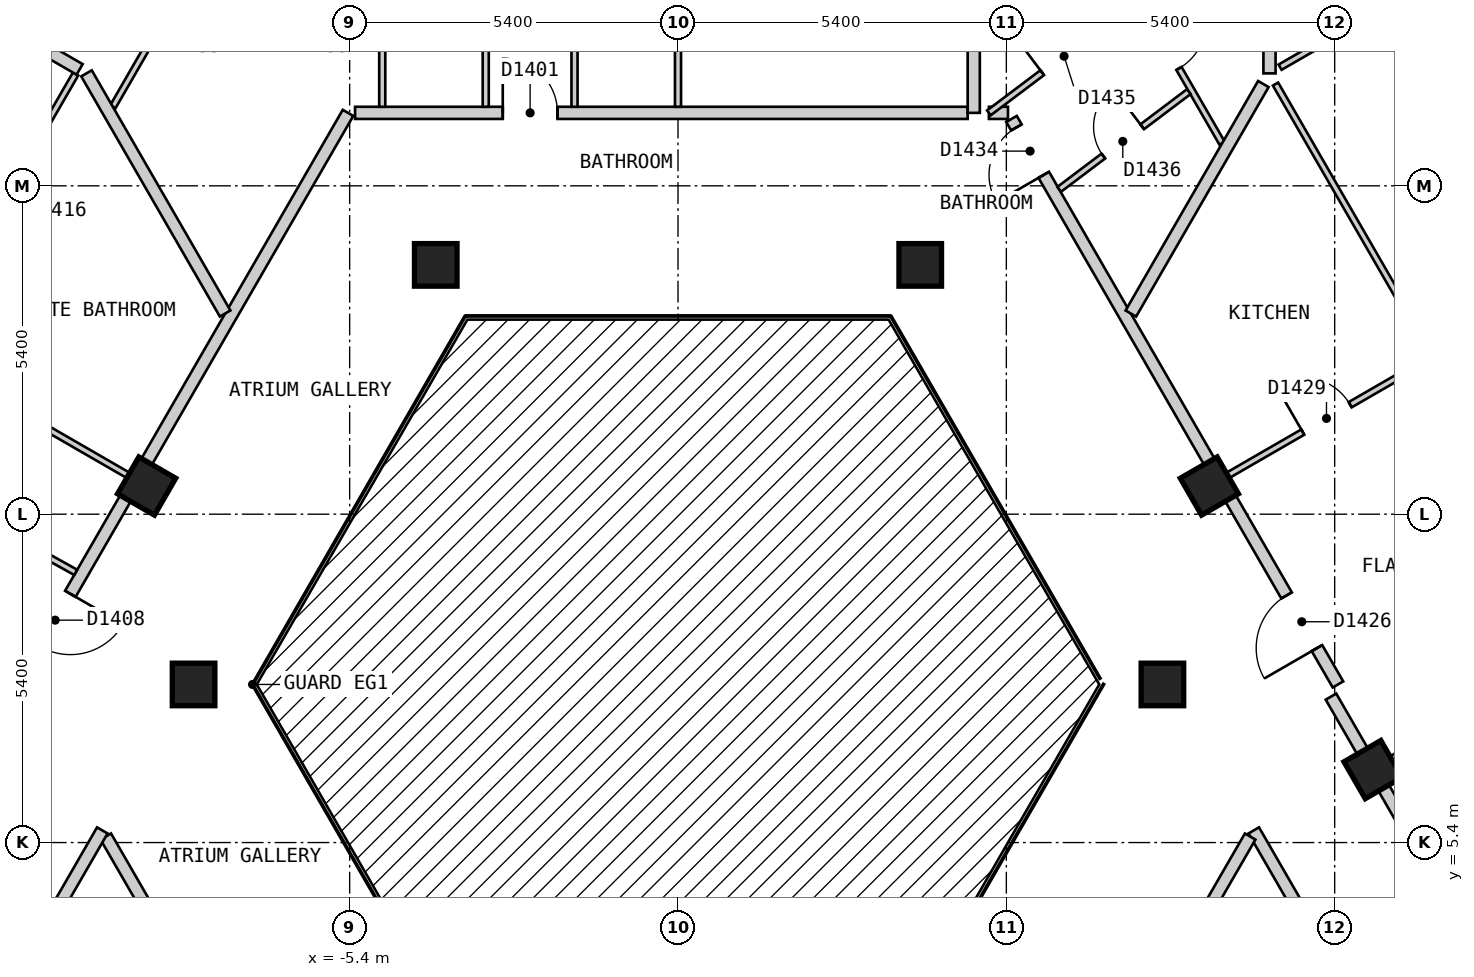
"""IFC4 building model, lengths in metres.
Left out: names, types, materials, properties, quantities, classifications, styles, units other than length and angle.
Written with IfcOpenShell. Run it as: python <this file> out.ifc"""

import sys

from ifc_helpers import new_model, si_unit, direction, frame, frame_2d, origin, origin_2d, place, context, subcontext, project, spatial, rectangle, extrude, element, fill, save


model = new_model("IFC4")
c1 = context("Model", 3, precision=1e-05, world=origin(), true_north=direction((0.0, 1.0)))
c2 = subcontext(c1, "Body", "Model", "MODEL_VIEW")
j1 = project(units=[si_unit("LENGTHUNIT", "METRE"), si_unit("PLANEANGLEUNIT", "RADIAN")], contexts=[c1])
p1 = place(None, origin())
s1 = spatial("IfcSite", under=j1, at=p1, CompositionType="ELEMENT")
p2 = place(p1, origin())
s2 = spatial("IfcBuilding", under=s1, at=p2, CompositionType="ELEMENT")
p3 = place(p2, frame((0.0, 0.0, 172.2)))
s3 = spatial("IfcBuildingStorey", under=s2, at=p3, CompositionType="ELEMENT", Elevation=172.2)
for number, where, z_axis, x_axis in (
    (1, (11.431, 6.6, 0.0), (0.0, 0.0, 1.0), (-0.5, 0.866, 0.0)),
    (2, (7.967, 8.0, 0.0), (0.0, 0.0, 1.0), (1.0, 0.0, 0.0)),
    (3, (8.739, 11.263, 0.0), (0.0, 0.0, 1.0), (-0.5, 0.866, 0.0)),
    (4, (3.984, 14.9, 0.0), (0.0, 0.0, 1.0), (1.0, 0.0, 0.0)),
    (5, (-3.984, 14.9, 0.0), (0.0, 0.0, 1.0), (1.0, 0.0, 0.0)),
    (6, (-8.739, 11.263, 0.0), (0.0, 0.0, 1.0), (-0.5, -0.866, 0.0)),
    (7, (-7.967, 8.0, 0.0), (0.0, 0.0, 1.0), (1.0, 0.0, 0.0)),
):
    element("IfcColumn", number, at=place(p3, frame(where, z_axis=z_axis, x_axis=x_axis)), inside=s3, PredefinedType="COLUMN", context=c2, shape_type="SweptSolid", body=[
        extrude(rectangle(XDim=0.7, YDim=0.7, at=origin_2d()), origin(), (0.0, 0.0, 1.0), 3.0),
    ])
p4 = place(p3, frame((-9.411, 5.5, 0.0), z_axis=(0.0, 0.0, 1.0), x_axis=(0.500018099276, -0.86601495391, 0.0)))
e8 = element("IfcWall", 8, at=p4, inside=s3, PredefinedType="PARTITIONING", context=c2, shape_type="SweptSolid", body=[
    extrude(rectangle(XDim=4.765, YDim=0.2, at=frame_2d((2.383, 0.0))), origin(), (0.0, 0.0, 1.0), 2.7),
])
p5 = place(p3, frame((9.469, 5.6, 0.0), z_axis=(0.0, 0.0, 1.0), x_axis=(0.499964524401, -0.866045884662, 0.0)))
e9 = element("IfcWall", 9, at=p5, inside=s3, PredefinedType="PARTITIONING", context=c2, shape_type="SweptSolid", body=[
    extrude(rectangle(XDim=7.042, YDim=0.2, at=frame_2d((3.521, 0.0))), origin(), (0.0, 0.0, 1.0), 2.7),
])
p6 = place(p5, frame((3.129, 0.0, 0.0)))
e10 = element("IfcOpeningElement", 10, at=p6, cuts=e9, PredefinedType="OPENING", context=c2, shape_type="SweptSolid", body=[
    extrude(rectangle(XDim=0.9, YDim=2.1, at=frame_2d((0.45, 1.05))), frame((0.0, 0.11, 0.0), z_axis=(0.0, -1.0, 0.0), x_axis=(1.0, 0.0, 0.0)), (0.0, 0.0, 1.0), 0.22),
])
p7 = place(p3, frame((10.739, 7.8, 0.0), z_axis=(0.0, 0.0, 1.0), x_axis=(0.499964311759, -0.86604600742, 0.0)))
e11 = element("IfcWall", 11, at=p7, inside=s3, PredefinedType="PARTITIONING", context=c2, shape_type="SweptSolid", body=[
    extrude(rectangle(XDim=9.583, YDim=0.2, at=frame_2d((4.792, 0.0))), origin(), (0.0, 0.0, 1.0), 2.7),
])
p8 = place(p3, frame((5.485, 17.3, 0.0), z_axis=(0.0, 0.0, 1.0), x_axis=(0.499965832213, -0.866045129667, 0.0)))
e12 = element("IfcWall", 12, at=p8, inside=s3, PredefinedType="PARTITIONING", context=c2, shape_type="SweptSolid", body=[
    extrude(rectangle(XDim=10.739, YDim=0.2, at=frame_2d((5.369, 0.0))), origin(), (0.0, 0.0, 1.0), 2.7),
])
p9 = place(p8, frame((9.048, 0.0, 0.0)))
e13 = element("IfcOpeningElement", 13, at=p9, cuts=e12, PredefinedType="OPENING", context=c2, shape_type="SweptSolid", body=[
    extrude(rectangle(XDim=1.0, YDim=2.1, at=frame_2d((0.5, 1.05))), frame((0.0, 0.11, 0.0), z_axis=(0.0, -1.0, 0.0), x_axis=(1.0, 0.0, 0.0)), (0.0, 0.0, 1.0), 0.22),
])
p10 = place(p8, frame((0.161, 0.0, 0.0)))
e14 = element("IfcOpeningElement", 14, at=p10, cuts=e12, PredefinedType="OPENING", context=c2, shape_type="SweptSolid", body=[
    extrude(rectangle(XDim=0.9, YDim=2.1, at=frame_2d((0.45, 1.05))), frame((0.0, 0.11, 0.0), z_axis=(0.0, -1.0, 0.0), x_axis=(1.0, 0.0, 0.0)), (0.0, 0.0, 1.0), 0.22),
])
p11 = place(p3, frame((-5.311, 17.4, 0.0), z_axis=(0.0, 0.0, 1.0), x_axis=(1.0, 0.0, 0.0)))
e15 = element("IfcWall", 15, at=p11, inside=s3, PredefinedType="PARTITIONING", context=c2, shape_type="SweptSolid", body=[
    extrude(rectangle(XDim=10.075, YDim=0.2, at=frame_2d((5.038, 0.0))), origin(), (0.0, 0.0, 1.0), 2.7),
])
p12 = place(p11, frame((2.429, 0.0, 0.0)))
e16 = element("IfcOpeningElement", 16, at=p12, cuts=e15, PredefinedType="OPENING", context=c2, shape_type="SweptSolid", body=[
    extrude(rectangle(XDim=0.9, YDim=2.1, at=frame_2d((0.45, 1.05))), frame((0.0, 0.11, 0.0), z_axis=(0.0, -1.0, 0.0), x_axis=(1.0, 0.0, 0.0)), (0.0, 0.0, 1.0), 0.22),
])
p13 = place(p3, frame((5.113, 17.4, 0.0), z_axis=(0.0, 0.0, 1.0), x_axis=(1.0, 0.0, 0.0)))
e17 = element("IfcWall", 17, at=p13, inside=s3, PredefinedType="PARTITIONING", context=c2, shape_type="SweptSolid", body=[
    extrude(rectangle(XDim=0.314, YDim=0.2, at=frame_2d((0.157, 0.0))), origin(), (0.0, 0.0, 1.0), 2.7),
])
p14 = place(p3, frame((7.028, 1.373, 0.0), z_axis=(0.0, 0.0, 1.0), x_axis=(0.499953126767, 0.866052464367, 0.0)))
e18 = element("IfcWall", 18, at=p14, inside=s3, PredefinedType="PARTITIONING", context=c2, shape_type="SweptSolid", body=[
    extrude(rectangle(XDim=4.764, YDim=0.2, at=frame_2d((2.382, 0.0))), origin(), (0.0, 0.0, 1.0), 2.7),
])
p15 = place(p3, frame((-13.048, -0.601, 0.0), z_axis=(0.0, 0.0, 1.0), x_axis=(0.499982180423, 0.866035691677, 0.0)))
e19 = element("IfcWall", 19, at=p15, inside=s3, PredefinedType="PARTITIONING", context=c2, shape_type="SweptSolid", body=[
    extrude(rectangle(XDim=7.16, YDim=0.2, at=frame_2d((3.58, 0.0))), origin(), (0.0, 0.0, 1.0), 2.7),
])
p16 = place(p15, frame((3.13, 0.0, 0.0)))
e20 = element("IfcOpeningElement", 20, at=p16, cuts=e19, PredefinedType="OPENING", context=c2, shape_type="SweptSolid", body=[
    extrude(rectangle(XDim=0.9, YDim=2.1, at=frame_2d((0.45, 1.05))), frame((0.0, 0.11, 0.0), z_axis=(0.0, -1.0, 0.0), x_axis=(1.0, 0.0, 0.0)), (0.0, 0.0, 1.0), 0.22),
])
p17 = place(p3, frame((-10.854, 8.0, 0.0), z_axis=(0.0, 0.0, 1.0), x_axis=(0.499997637144, 0.866026767976, 0.0)))
e21 = element("IfcWall", 21, at=p17, inside=s3, PredefinedType="PARTITIONING", context=c2, shape_type="SweptSolid", body=[
    extrude(rectangle(XDim=10.854, YDim=0.2, at=frame_2d((5.427, 0.0))), origin(), (0.0, 0.0, 1.0), 2.7),
])
p18 = place(p17, frame((0.721, 0.0, 0.0)))
e22 = element("IfcOpeningElement", 22, at=p18, cuts=e21, PredefinedType="OPENING", context=c2, shape_type="SweptSolid", body=[
    extrude(rectangle(XDim=1.0, YDim=2.1, at=frame_2d((0.5, 1.05))), frame((0.0, 0.11, 0.0), z_axis=(0.0, -1.0, 0.0), x_axis=(1.0, 0.0, 0.0)), (0.0, 0.0, 1.0), 0.22),
])
p19 = place(p3, frame((7.073, 20.15, 0.0), z_axis=(0.0, 0.0, 1.0), x_axis=(0.499917691695, -0.866072919292, 0.0)))
e23 = element("IfcWall", 23, at=p19, inside=s3, PredefinedType="PARTITIONING", context=c2, shape_type="SweptSolid", body=[
    extrude(rectangle(XDim=3.753, YDim=0.1, at=frame_2d((1.876, 0.0))), origin(), (0.0, 0.0, 1.0), 2.7),
])
p20 = place(p19, frame((1.432, 0.0, 0.0)))
e24 = element("IfcOpeningElement", 24, at=p20, cuts=e23, PredefinedType="OPENING", context=c2, shape_type="SweptSolid", body=[
    extrude(rectangle(XDim=0.9, YDim=2.1, at=frame_2d((0.45, 1.05))), frame((0.0, 0.06, 0.0), z_axis=(0.0, -1.0, 0.0), x_axis=(1.0, 0.0, 0.0)), (0.0, 0.0, 1.0), 0.12),
])
p21 = place(p3, frame((9.827, 17.874, 0.0), z_axis=(0.0, 0.0, 1.0), x_axis=(0.499962189394, -0.866047232647, 0.0)))
e25 = element("IfcWall", 25, at=p21, inside=s3, PredefinedType="PARTITIONING", context=c2, shape_type="SweptSolid", body=[
    extrude(rectangle(XDim=11.401, YDim=0.1, at=frame_2d((5.701, 0.0))), origin(), (0.0, 0.0, 1.0), 2.7),
])
p22 = place(p21, frame((7.433, 0.0, 0.0)))
e26 = element("IfcOpeningElement", 26, at=p22, cuts=e25, PredefinedType="OPENING", context=c2, shape_type="SweptSolid", body=[
    extrude(rectangle(XDim=0.9, YDim=2.1, at=frame_2d((0.45, 1.05))), frame((0.0, 0.06, 0.0), z_axis=(0.0, -1.0, 0.0), x_axis=(1.0, 0.0, 0.0)), (0.0, 0.0, 1.0), 0.12),
])
p23 = place(p3, frame((-4.864, 20.769, 0.0), z_axis=(0.0, 0.0, 1.0), x_axis=(0.0, -1.0, 0.0)))
e27 = element("IfcWall", 27, at=p23, inside=s3, PredefinedType="PARTITIONING", context=c2, shape_type="SweptSolid", body=[
    extrude(rectangle(XDim=3.269, YDim=0.1, at=frame_2d((1.635, 0.0))), origin(), (0.0, 0.0, 1.0), 2.7),
])
p24 = place(p3, frame((0.0, 20.43, 0.0), z_axis=(0.0, 0.0, 1.0), x_axis=(0.0, -1.0, 0.0)))
e28 = element("IfcWall", 28, at=p24, inside=s3, PredefinedType="PARTITIONING", context=c2, shape_type="SweptSolid", body=[
    extrude(rectangle(XDim=2.93, YDim=0.1, at=frame_2d((1.465, 0.0))), origin(), (0.0, 0.0, 1.0), 2.7),
])
p25 = place(p3, frame((-13.444, 11.814, 0.0), z_axis=(0.0, 0.0, 1.0), x_axis=(0.873653620945, -0.486548405207, 0.0)))
e29 = element("IfcWall", 29, at=p25, inside=s3, PredefinedType="PARTITIONING", context=c2, shape_type="SweptSolid", body=[
    extrude(rectangle(XDim=4.051, YDim=0.1, at=frame_2d((2.025, 0.0))), origin(), (0.0, 0.0, 1.0), 2.7),
])
p26 = place(p25, frame((1.65, 0.0, 0.0)))
e30 = element("IfcOpeningElement", 30, at=p26, cuts=e29, PredefinedType="OPENING", context=c2, shape_type="SweptSolid", body=[
    extrude(rectangle(XDim=0.8, YDim=2.1, at=frame_2d((0.4, 1.05))), frame((0.0, 0.06, 0.0), z_axis=(0.0, -1.0, 0.0), x_axis=(1.0, 0.0, 0.0)), (0.0, 0.0, 1.0), 0.12),
])
p27 = place(p3, frame((-9.295, 17.5, 0.0), z_axis=(0.0, 0.0, 1.0), x_axis=(0.500060839138, 0.865990275442, 0.0)))
e31 = element("IfcWall", 31, at=p27, inside=s3, PredefinedType="PARTITIONING", context=c2, shape_type="SweptSolid", body=[
    extrude(rectangle(XDim=3.81, YDim=0.1, at=frame_2d((1.905, 0.0))), origin(), (0.0, 0.0, 1.0), 2.7),
])
p28 = place(p27, frame((2.079, 0.0, 0.0)))
e32 = element("IfcOpeningElement", 32, at=p28, cuts=e31, PredefinedType="OPENING", context=c2, shape_type="SweptSolid", body=[
    extrude(rectangle(XDim=0.8, YDim=2.1, at=frame_2d((0.4, 1.05))), frame((0.0, 0.06, 0.0), z_axis=(0.0, -1.0, 0.0), x_axis=(1.0, 0.0, 0.0)), (0.0, 0.0, 1.0), 0.12),
])
p29 = place(p3, frame((-15.704, 8.0, 0.0), z_axis=(0.0, 0.0, 1.0), x_axis=(0.500005637941, 0.866022148693, 0.0)))
e33 = element("IfcWall", 33, at=p29, inside=s3, PredefinedType="PARTITIONING", context=c2, shape_type="SweptSolid", body=[
    extrude(rectangle(XDim=11.592, YDim=0.1, at=frame_2d((5.796, 0.0))), origin(), (0.0, 0.0, 1.0), 2.7),
])
p30 = place(p29, frame((3.132, 0.0, 0.0)))
e34 = element("IfcOpeningElement", 34, at=p30, cuts=e33, PredefinedType="OPENING", context=c2, shape_type="SweptSolid", body=[
    extrude(rectangle(XDim=0.9, YDim=2.1, at=frame_2d((0.45, 1.05))), frame((0.0, 0.06, 0.0), z_axis=(0.0, -1.0, 0.0), x_axis=(1.0, 0.0, 0.0)), (0.0, 0.0, 1.0), 0.12),
])
p31 = place(p29, frame((8.6, 0.0, 0.0)))
e35 = element("IfcOpeningElement", 35, at=p31, cuts=e33, PredefinedType="OPENING", context=c2, shape_type="SweptSolid", body=[
    extrude(rectangle(XDim=0.8, YDim=2.1, at=frame_2d((0.4, 1.05))), frame((0.0, 0.06, 0.0), z_axis=(0.0, -1.0, 0.0), x_axis=(1.0, 0.0, 0.0)), (0.0, 0.0, 1.0), 0.12),
])
p32 = place(p3, frame((-3.162, 17.5, 0.0), z_axis=(0.0, 0.0, 1.0), x_axis=(0.0, 1.0, 0.0)))
e36 = element("IfcWall", 36, at=p32, inside=s3, PredefinedType="PARTITIONING", context=c2, shape_type="SweptSolid", body=[
    extrude(rectangle(XDim=2.959, YDim=0.1, at=frame_2d((1.479, 0.0))), origin(), (0.0, 0.0, 1.0), 2.7),
])
p33 = place(p32, frame((0.98, 0.0, 0.0)))
e37 = element("IfcOpeningElement", 37, at=p33, cuts=e36, PredefinedType="OPENING", context=c2, shape_type="SweptSolid", body=[
    extrude(rectangle(XDim=0.9, YDim=2.1, at=frame_2d((0.45, 1.05))), frame((0.0, 0.06, 0.0), z_axis=(0.0, -1.0, 0.0), x_axis=(1.0, 0.0, 0.0)), (0.0, 0.0, 1.0), 0.12),
])
p34 = place(p3, frame((-1.702, 17.5, 0.0), z_axis=(0.0, 0.0, 1.0), x_axis=(0.0, 1.0, 0.0)))
e38 = element("IfcWall", 38, at=p34, inside=s3, PredefinedType="PARTITIONING", context=c2, shape_type="SweptSolid", body=[
    extrude(rectangle(XDim=2.91, YDim=0.1, at=frame_2d((1.455, 0.0))), origin(), (0.0, 0.0, 1.0), 2.7),
])
p35 = place(p34, frame((1.03, 0.0, 0.0)))
e39 = element("IfcOpeningElement", 39, at=p35, cuts=e38, PredefinedType="OPENING", context=c2, shape_type="SweptSolid", body=[
    extrude(rectangle(XDim=0.8, YDim=2.1, at=frame_2d((0.4, 1.05))), frame((0.0, 0.06, 0.0), z_axis=(0.0, -1.0, 0.0), x_axis=(1.0, 0.0, 0.0)), (0.0, 0.0, 1.0), 0.12),
])
p36 = place(p3, frame((11.518, 6.65, 0.0), z_axis=(0.0, 0.0, 1.0), x_axis=(0.865949381454, 0.500131651427, 0.0)))
e40 = element("IfcWall", 40, at=p36, inside=s3, PredefinedType="PARTITIONING", context=c2, shape_type="SweptSolid", body=[
    extrude(rectangle(XDim=4.097, YDim=0.1, at=frame_2d((2.049, 0.0))), origin(), (0.0, 0.0, 1.0), 2.7),
])
p37 = place(p36, frame((1.623, 0.0, 0.0)))
e41 = element("IfcOpeningElement", 41, at=p37, cuts=e40, PredefinedType="OPENING", context=c2, shape_type="SweptSolid", body=[
    extrude(rectangle(XDim=0.8, YDim=2.1, at=frame_2d((0.4, 1.05))), frame((0.0, 0.06, 0.0), z_axis=(0.0, -1.0, 0.0), x_axis=(1.0, 0.0, 0.0)), (0.0, 0.0, 1.0), 0.12),
])
p38 = place(p3, frame((8.999, 11.413, 0.0), z_axis=(0.0, 0.0, 1.0), x_axis=(0.865969252911, 0.500097243556, 0.0)))
e42 = element("IfcWall", 42, at=p38, inside=s3, PredefinedType="PARTITIONING", context=c2, shape_type="SweptSolid", body=[
    extrude(rectangle(XDim=3.947, YDim=0.1, at=frame_2d((1.974, 0.0))), origin(), (0.0, 0.0, 1.0), 2.7),
])
p39 = place(p38, frame((1.474, 0.0, 0.0)))
e43 = element("IfcOpeningElement", 43, at=p39, cuts=e42, PredefinedType="OPENING", context=c2, shape_type="SweptSolid", body=[
    extrude(rectangle(XDim=0.9, YDim=2.1, at=frame_2d((0.45, 1.05))), frame((0.0, 0.06, 0.0), z_axis=(0.0, -1.0, 0.0), x_axis=(1.0, 0.0, 0.0)), (0.0, 0.0, 1.0), 0.12),
])
p40 = place(p3, frame((9.902, 18.151, 0.0), z_axis=(0.0, 0.0, 1.0), x_axis=(0.866032278734, 0.499988092049, 0.0)))
e44 = element("IfcWall", 44, at=p40, inside=s3, PredefinedType="PARTITIONING", context=c2, shape_type="SweptSolid", body=[
    extrude(rectangle(XDim=5.649, YDim=0.1, at=frame_2d((2.824, 0.0))), origin(), (0.0, 0.0, 1.0), 2.7),
])
p41 = place(p40, frame((2.274, 0.0, 0.0)))
e45 = element("IfcOpeningElement", 45, at=p41, cuts=e44, PredefinedType="OPENING", context=c2, shape_type="SweptSolid", body=[
    extrude(rectangle(XDim=0.9, YDim=2.1, at=frame_2d((0.45, 1.05))), frame((0.0, 0.06, 0.0), z_axis=(0.0, -1.0, 0.0), x_axis=(1.0, 0.0, 0.0)), (0.0, 0.0, 1.0), 0.12),
])
p42 = place(p3, frame((6.269, 16.142, 0.0), z_axis=(0.0, 0.0, 1.0), x_axis=(0.798549086509, 0.601929693931, 0.0)))
e46 = element("IfcWall", 46, at=p42, inside=s3, PredefinedType="PARTITIONING", context=c2, shape_type="SweptSolid", body=[
    extrude(rectangle(XDim=2.67, YDim=0.1, at=frame_2d((1.335, 0.0))), origin(), (0.0, 0.0, 1.0), 2.7),
])
p43 = place(p42, frame((0.91, 0.0, 0.0)))
e47 = element("IfcOpeningElement", 47, at=p43, cuts=e46, PredefinedType="OPENING", context=c2, shape_type="SweptSolid", body=[
    extrude(rectangle(XDim=0.8, YDim=2.1, at=frame_2d((0.4, 1.05))), frame((0.0, 0.06, 0.0), z_axis=(0.0, -1.0, 0.0), x_axis=(1.0, 0.0, 0.0)), (0.0, 0.0, 1.0), 0.12),
])
p44 = place(p3, frame((5.113, 17.4, 0.0), z_axis=(0.0, 0.0, 1.0), x_axis=(0.798718434647, 0.601704962714, 0.0)))
e48 = element("IfcWall", 48, at=p44, inside=s3, PredefinedType="PARTITIONING", context=c2, shape_type="SweptSolid", body=[
    extrude(rectangle(XDim=3.045, YDim=0.1, at=frame_2d((1.522, 0.0))), origin(), (0.0, 0.0, 1.0), 2.7),
])
p45 = place(p44, frame((1.098, 0.0, 0.0)))
e49 = element("IfcOpeningElement", 49, at=p45, cuts=e48, PredefinedType="OPENING", context=c2, shape_type="SweptSolid", body=[
    extrude(rectangle(XDim=0.9, YDim=2.1, at=frame_2d((0.45, 1.05))), frame((0.0, 0.06, 0.0), z_axis=(0.0, -1.0, 0.0), x_axis=(1.0, 0.0, 0.0)), (0.0, 0.0, 1.0), 0.12),
])
p46 = place(p3, frame((-9.728, 18.05, 0.0), z_axis=(0.0, 0.0, 1.0), x_axis=(0.499921709333, -0.866070600204, 0.0)))
e50 = element("IfcWall", 50, at=p46, inside=s3, PredefinedType="PARTITIONING", context=c2, shape_type="SweptSolid", body=[
    extrude(rectangle(XDim=4.561, YDim=0.2, at=frame_2d((2.28, 0.0))), origin(), (0.0, 0.0, 1.0), 2.7),
])
p47 = place(p3, frame((-14.794, 20.975, 0.0), z_axis=(0.0, 0.0, 1.0), x_axis=(0.865982978614, -0.500073475352, 0.0)))
e51 = element("IfcWall", 51, at=p47, inside=s3, PredefinedType="PARTITIONING", context=c2, shape_type="SweptSolid", body=[
    extrude(rectangle(XDim=5.719, YDim=0.2, at=frame_2d((2.86, 0.0))), origin(), (0.0, 0.0, 1.0), 2.7),
])
p48 = place(p3, frame((7.448, 14.1, 0.0), z_axis=(0.0, 0.0, 1.0), x_axis=(0.500013426303, 0.866017651966, 0.0)))
e52 = element("IfcWall", 52, at=p48, inside=s3, PredefinedType="PARTITIONING", context=c2, shape_type="SweptSolid", body=[
    extrude(rectangle(XDim=4.358, YDim=0.2, at=frame_2d((2.179, 0.0))), origin(), (0.0, 0.0, 1.0), 2.7),
])
p49 = place(p3, frame((4.864, 17.4, 0.0), z_axis=(0.0, 0.0, 1.0), x_axis=(0.0, 1.0, 0.0)))
e53 = element("IfcWall", 53, at=p49, inside=s3, PredefinedType="PARTITIONING", context=c2, shape_type="SweptSolid", body=[
    extrude(rectangle(XDim=2.82, YDim=0.2, at=frame_2d((1.41, 0.0))), origin(), (0.0, 0.0, 1.0), 2.7),
])
p50 = place(p3, frame((9.728, 18.049, 0.0), z_axis=(0.0, 0.0, 1.0), x_axis=(0.0, 1.0, 0.0)))
e54 = element("IfcWall", 54, at=p50, inside=s3, PredefinedType="PARTITIONING", context=c2, shape_type="SweptSolid", body=[
    extrude(rectangle(XDim=5.851, YDim=0.2, at=frame_2d((2.925, 0.0))), origin(), (0.0, 0.0, 1.0), 2.7),
])
p51 = place(p3, frame((-12.55, 13.463, 0.0), z_axis=(0.0, 0.0, 1.0), x_axis=(0.86606561423, -0.499930346997, 0.0)))
e55 = element("IfcWall", 55, at=p51, inside=s3, PredefinedType="PARTITIONING", context=c2, shape_type="SweptSolid", body=[
    extrude(rectangle(XDim=4.1, YDim=0.1, at=frame_2d((2.05, 0.0))), origin(), (0.0, 0.0, 1.0), 2.7),
])
p52 = place(p12, origin())
e56 = element("IfcDoor", 56, at=p52, inside=s3, OperationType="SINGLE_SWING_LEFT", PredefinedType="DOOR", context=c2, shape_type="SweptSolid", body=[
    extrude(rectangle(XDim=0.9, YDim=2.1, at=frame_2d((0.45, 1.05))), frame((0.0, 0.025, 0.0), z_axis=(0.0, -1.0, 0.0), x_axis=(1.0, 0.0, 0.0)), (0.0, 0.0, 1.0), 0.05),
])
fill(e16, e56)
p53 = place(p18, origin())
e57 = element("IfcDoor", 57, at=p53, inside=s3, OperationType="SINGLE_SWING_RIGHT", PredefinedType="DOOR", context=c2, shape_type="SweptSolid", body=[
    extrude(rectangle(XDim=1.0, YDim=2.1, at=frame_2d((0.5, 1.05))), frame((0.0, 0.025, 0.0), z_axis=(0.0, -1.0, 0.0), x_axis=(1.0, 0.0, 0.0)), (0.0, 0.0, 1.0), 0.05),
])
fill(e22, e57)
p54 = place(p9, origin())
e58 = element("IfcDoor", 58, at=p54, inside=s3, OperationType="SINGLE_SWING_RIGHT", PredefinedType="DOOR", context=c2, shape_type="SweptSolid", body=[
    extrude(rectangle(XDim=1.0, YDim=2.1, at=frame_2d((0.5, 1.05))), frame((0.0, 0.025, 0.0), z_axis=(0.0, -1.0, 0.0), x_axis=(1.0, 0.0, 0.0)), (0.0, 0.0, 1.0), 0.05),
])
fill(e13, e58)
p55 = place(p39, origin())
e59 = element("IfcDoor", 59, at=p55, inside=s3, OperationType="SINGLE_SWING_LEFT", PredefinedType="DOOR", context=c2, shape_type="SweptSolid", body=[
    extrude(rectangle(XDim=0.9, YDim=2.1, at=frame_2d((0.45, 1.05))), frame((0.0, 0.025, 0.0), z_axis=(0.0, -1.0, 0.0), x_axis=(1.0, 0.0, 0.0)), (0.0, 0.0, 1.0), 0.05),
])
fill(e43, e59)
p56 = place(p10, origin())
e60 = element("IfcDoor", 60, at=p56, inside=s3, OperationType="SINGLE_SWING_RIGHT", PredefinedType="DOOR", context=c2, shape_type="SweptSolid", body=[
    extrude(rectangle(XDim=0.9, YDim=2.1, at=frame_2d((0.45, 1.05))), frame((0.0, 0.025, 0.0), z_axis=(0.0, -1.0, 0.0), x_axis=(1.0, 0.0, 0.0)), (0.0, 0.0, 1.0), 0.05),
])
fill(e14, e60)
p57 = place(p45, origin())
e61 = element("IfcDoor", 61, at=p57, inside=s3, OperationType="SINGLE_SWING_LEFT", PredefinedType="DOOR", context=c2, shape_type="SweptSolid", body=[
    extrude(rectangle(XDim=0.9, YDim=2.1, at=frame_2d((0.45, 1.05))), frame((0.0, 0.025, 0.0), z_axis=(0.0, -1.0, 0.0), x_axis=(1.0, 0.0, 0.0)), (0.0, 0.0, 1.0), 0.05),
])
fill(e49, e61)
p58 = place(p43, origin())
e62 = element("IfcDoor", 62, at=p58, inside=s3, OperationType="SINGLE_SWING_RIGHT", PredefinedType="DOOR", context=c2, shape_type="SweptSolid", body=[
    extrude(rectangle(XDim=0.8, YDim=2.1, at=frame_2d((0.4, 1.05))), frame((0.0, 0.025, 0.0), z_axis=(0.0, -1.0, 0.0), x_axis=(1.0, 0.0, 0.0)), (0.0, 0.0, 1.0), 0.05),
])
fill(e47, e62)
p59 = place(p20, origin())
e63 = element("IfcDoor", 63, at=p59, inside=s3, OperationType="SINGLE_SWING_LEFT", PredefinedType="DOOR", context=c2, shape_type="SweptSolid", body=[
    extrude(rectangle(XDim=0.9, YDim=2.1, at=frame_2d((0.45, 1.05))), frame((0.0, 0.025, 0.0), z_axis=(0.0, -1.0, 0.0), x_axis=(1.0, 0.0, 0.0)), (0.0, 0.0, 1.0), 0.05),
])
fill(e24, e63)
save(model, sys.argv[1])
